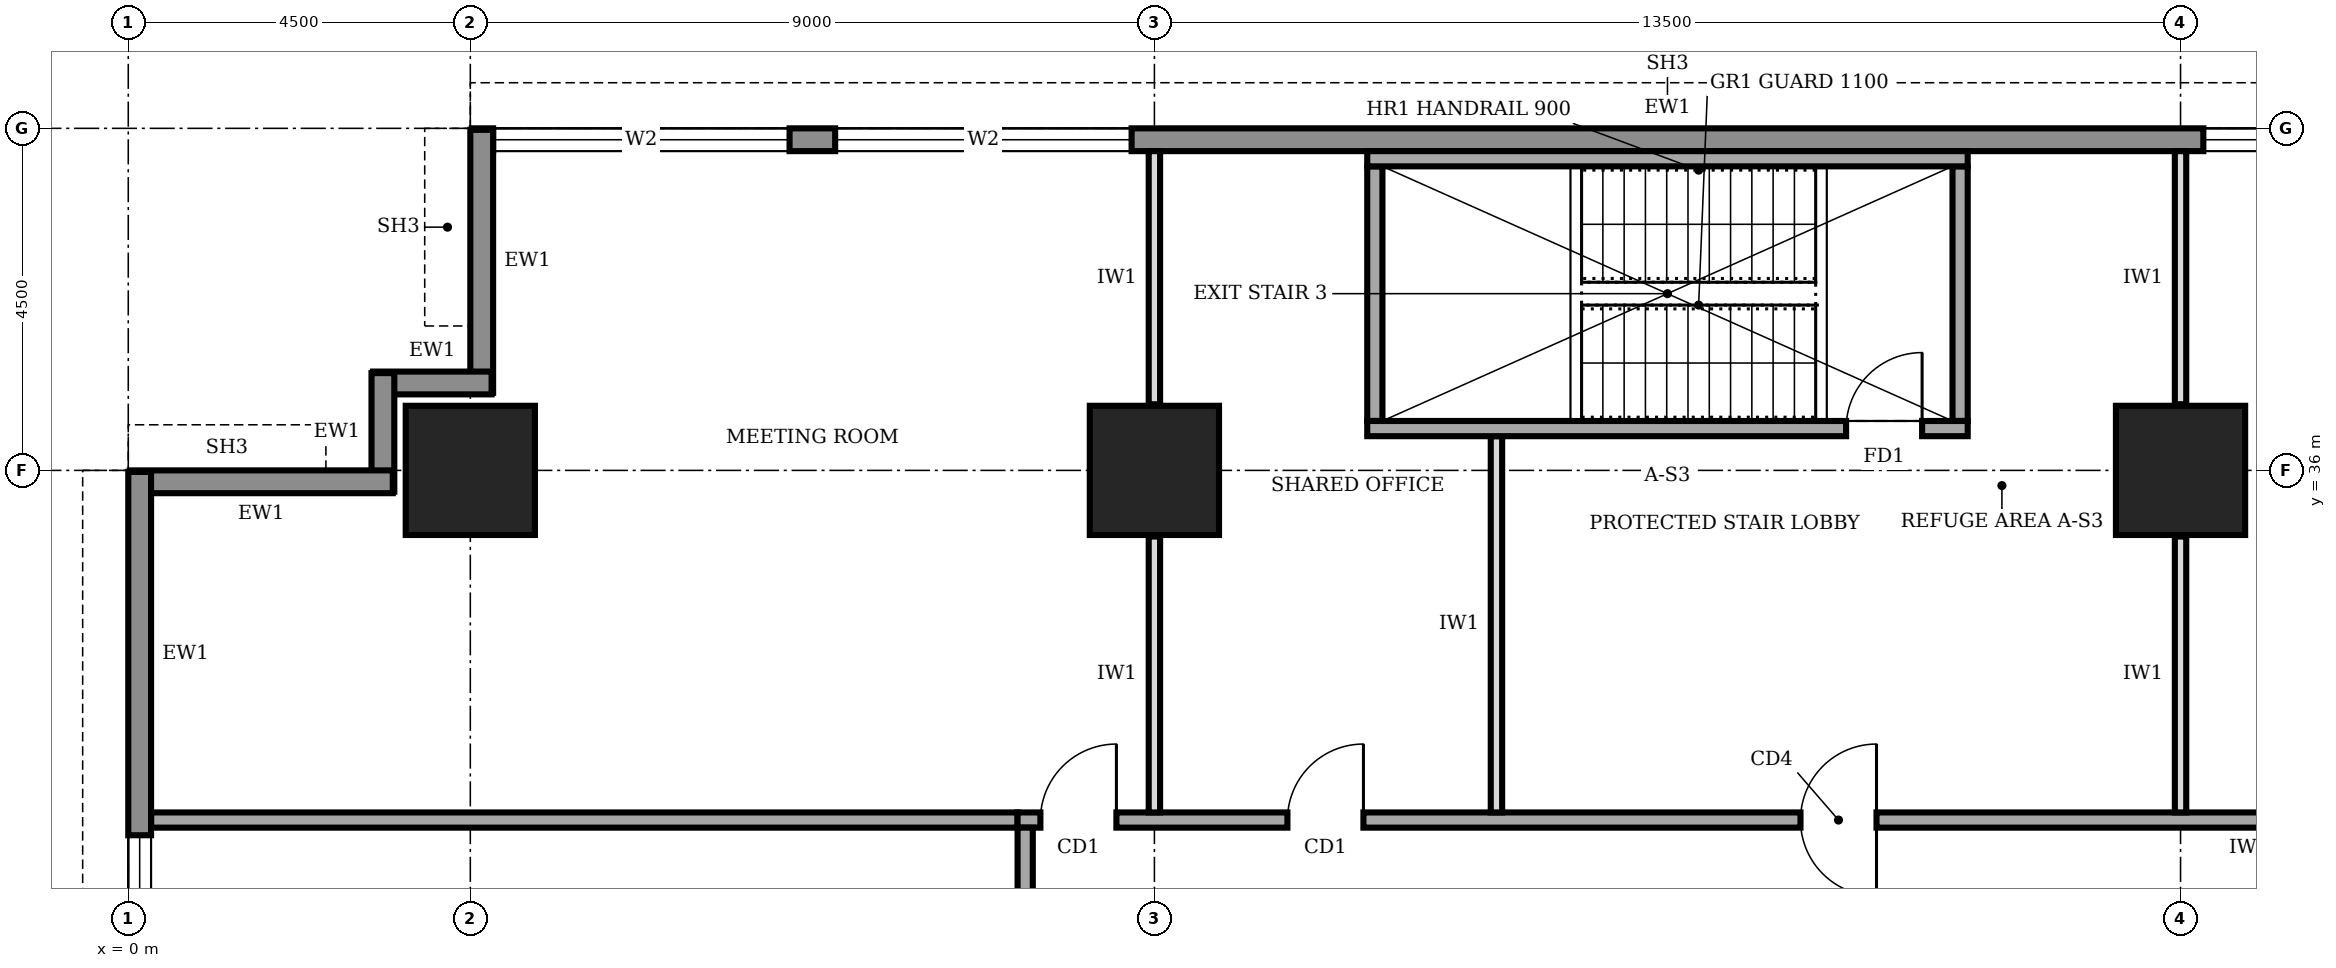
"""IFC4 building model, lengths in metres.
Left out: names, types, materials, properties, quantities, classifications, styles, units other than length and angle.
Written with IfcOpenShell. Run it as: python <this file> out.ifc"""

import sys

from ifc_helpers import new_model, si_unit, direction, frame, frame_2d, origin, origin_2d, place, context, subcontext, project, spatial, rectangle, extrude, element, fill, save


model = new_model("IFC4")
c1 = context("Model", 3, precision=1e-05, world=origin(), true_north=direction((0.0, 1.0)))
c2 = subcontext(c1, "Body", "Model", "MODEL_VIEW")
j1 = project(units=[si_unit("LENGTHUNIT", "METRE"), si_unit("PLANEANGLEUNIT", "RADIAN")], contexts=[c1])
p1 = place(None, origin())
s1 = spatial("IfcSite", under=j1, at=p1, CompositionType="ELEMENT")
p2 = place(p1, origin())
s2 = spatial("IfcBuilding", under=s1, at=p2, CompositionType="ELEMENT")
p3 = place(p2, frame((0.0, 0.0, 145.0)))
s3 = spatial("IfcBuildingStorey", under=s2, at=p3, CompositionType="ELEMENT", Elevation=145.0)
for number, where, z_axis, x_axis in (
    (1, (4.5, 36.0, 0.0), (0.0, 0.0, 1.0), (1.0, 0.0, 0.0)),
    (2, (13.5, 36.0, 0.0), (0.0, 0.0, 1.0), (1.0, 0.0, 0.0)),
    (3, (27.0, 36.0, 0.0), (0.0, 0.0, 1.0), (1.0, 0.0, 0.0)),
):
    element("IfcColumn", number, at=place(p3, frame(where, z_axis=z_axis, x_axis=x_axis)), inside=s3, PredefinedType="COLUMN", context=c2, shape_type="SweptSolid", body=[
        extrude(rectangle(XDim=1.7, YDim=1.7, at=origin_2d()), origin(), (0.0, 0.0, 1.0), 4.0),
    ])
p4 = place(p3, frame((35.98, 40.35, 0.0), z_axis=(0.0, 0.0, 1.0), x_axis=(-1.0, 0.0, 0.0)))
e4 = element("IfcWall", 4, at=p4, inside=s3, PredefinedType="STANDARD", context=c2, shape_type="SweptSolid", body=[
    extrude(rectangle(XDim=31.46, YDim=0.3, at=frame_2d((15.73, 0.0))), origin(), (0.0, 0.0, 1.0), 3.75),
])
p5 = place(p4, frame((27.28, 0.0, 0.6)))
e5 = element("IfcOpeningElement", 5, at=p5, cuts=e4, PredefinedType="OPENING", context=c2, shape_type="SweptSolid", body=[
    extrude(rectangle(XDim=3.9, YDim=2.6, at=frame_2d((1.95, 1.3))), frame((0.0, 0.16, 0.0), z_axis=(0.0, -1.0, 0.0), x_axis=(1.0, 0.0, 0.0)), (0.0, 0.0, 1.0), 0.32),
])
p6 = place(p4, frame((22.78, 0.0, 0.6)))
e6 = element("IfcOpeningElement", 6, at=p6, cuts=e4, PredefinedType="OPENING", context=c2, shape_type="SweptSolid", body=[
    extrude(rectangle(XDim=3.9, YDim=2.6, at=frame_2d((1.95, 1.3))), frame((0.0, 0.16, 0.0), z_axis=(0.0, -1.0, 0.0), x_axis=(1.0, 0.0, 0.0)), (0.0, 0.0, 1.0), 0.32),
])
p7 = place(p4, frame((4.78, 0.0, 0.6)))
e7 = element("IfcOpeningElement", 7, at=p7, cuts=e4, PredefinedType="OPENING", context=c2, shape_type="SweptSolid", body=[
    extrude(rectangle(XDim=3.9, YDim=2.6, at=frame_2d((1.95, 1.3))), frame((0.0, 0.16, 0.0), z_axis=(0.0, -1.0, 0.0), x_axis=(1.0, 0.0, 0.0)), (0.0, 0.0, 1.0), 0.32),
])
p8 = place(p3, frame((4.65, 40.48, 0.0), z_axis=(0.0, 0.0, 1.0), x_axis=(0.0, -1.0, 0.0)))
e8 = element("IfcWall", 8, at=p8, inside=s3, PredefinedType="STANDARD", context=c2, shape_type="SweptSolid", body=[
    extrude(rectangle(XDim=3.46, YDim=0.3, at=frame_2d((1.73, 0.0))), origin(), (0.0, 0.0, 1.0), 2.85),
])
for number, where, z_axis, x_axis in (
    (9, (4.78, 37.15, 0.0), (0.0, 0.0, 1.0), (-1.0, 0.0, 0.0)),
    (10, (3.35, 37.28, 0.0), (0.0, 0.0, 1.0), (0.0, -1.0, 0.0)),
):
    element("IfcWall", number, at=place(p3, frame(where, z_axis=z_axis, x_axis=x_axis)), inside=s3, PredefinedType="STANDARD", context=c2, shape_type="SweptSolid", body=[
        extrude(rectangle(XDim=1.56, YDim=0.3, at=frame_2d((0.78, 0.0))), origin(), (0.0, 0.0, 1.0), 3.75),
    ])
p9 = place(p3, frame((3.48, 35.85, 0.0), z_axis=(0.0, 0.0, 1.0), x_axis=(-1.0, 0.0, 0.0)))
e11 = element("IfcWall", 11, at=p9, inside=s3, PredefinedType="STANDARD", context=c2, shape_type="SweptSolid", body=[
    extrude(rectangle(XDim=3.46, YDim=0.3, at=frame_2d((1.73, 0.0))), origin(), (0.0, 0.0, 1.0), 2.85),
])
p10 = place(p3, frame((0.15, 35.98, 0.0), z_axis=(0.0, 0.0, 1.0), x_axis=(0.0, -1.0, 0.0)))
e12 = element("IfcWall", 12, at=p10, inside=s3, PredefinedType="STANDARD", context=c2, shape_type="SweptSolid", body=[
    extrude(rectangle(XDim=31.46, YDim=0.3, at=frame_2d((15.73, 0.0))), origin(), (0.0, 0.0, 1.0), 3.75),
])
p11 = place(p10, frame((27.28, 0.0, 0.6)))
e13 = element("IfcOpeningElement", 13, at=p11, cuts=e12, PredefinedType="OPENING", context=c2, shape_type="SweptSolid", body=[
    extrude(rectangle(XDim=3.9, YDim=2.6, at=frame_2d((1.95, 1.3))), frame((0.0, 0.16, 0.0), z_axis=(0.0, -1.0, 0.0), x_axis=(1.0, 0.0, 0.0)), (0.0, 0.0, 1.0), 0.32),
])
p12 = place(p10, frame((22.78, 0.0, 0.6)))
e14 = element("IfcOpeningElement", 14, at=p12, cuts=e12, PredefinedType="OPENING", context=c2, shape_type="SweptSolid", body=[
    extrude(rectangle(XDim=3.9, YDim=2.6, at=frame_2d((1.95, 1.3))), frame((0.0, 0.16, 0.0), z_axis=(0.0, -1.0, 0.0), x_axis=(1.0, 0.0, 0.0)), (0.0, 0.0, 1.0), 0.32),
])
p13 = place(p10, frame((18.28, 0.0, 0.6)))
e15 = element("IfcOpeningElement", 15, at=p13, cuts=e12, PredefinedType="OPENING", context=c2, shape_type="SweptSolid", body=[
    extrude(rectangle(XDim=3.9, YDim=2.6, at=frame_2d((1.95, 1.3))), frame((0.0, 0.16, 0.0), z_axis=(0.0, -1.0, 0.0), x_axis=(1.0, 0.0, 0.0)), (0.0, 0.0, 1.0), 0.32),
])
p14 = place(p10, frame((13.78, 0.0, 0.6)))
e16 = element("IfcOpeningElement", 16, at=p14, cuts=e12, PredefinedType="OPENING", context=c2, shape_type="SweptSolid", body=[
    extrude(rectangle(XDim=3.9, YDim=2.6, at=frame_2d((1.95, 1.3))), frame((0.0, 0.16, 0.0), z_axis=(0.0, -1.0, 0.0), x_axis=(1.0, 0.0, 0.0)), (0.0, 0.0, 1.0), 0.32),
])
p15 = place(p10, frame((9.28, 0.0, 0.6)))
e17 = element("IfcOpeningElement", 17, at=p15, cuts=e12, PredefinedType="OPENING", context=c2, shape_type="SweptSolid", body=[
    extrude(rectangle(XDim=3.9, YDim=2.6, at=frame_2d((1.95, 1.3))), frame((0.0, 0.16, 0.0), z_axis=(0.0, -1.0, 0.0), x_axis=(1.0, 0.0, 0.0)), (0.0, 0.0, 1.0), 0.32),
])
p16 = place(p10, frame((4.78, 0.0, 0.6)))
e18 = element("IfcOpeningElement", 18, at=p16, cuts=e12, PredefinedType="OPENING", context=c2, shape_type="SweptSolid", body=[
    extrude(rectangle(XDim=3.9, YDim=2.6, at=frame_2d((1.95, 1.3))), frame((0.0, 0.16, 0.0), z_axis=(0.0, -1.0, 0.0), x_axis=(1.0, 0.0, 0.0)), (0.0, 0.0, 1.0), 0.32),
])
p17 = place(p3, frame((40.2, 31.4, 0.0), z_axis=(0.0, 0.0, 1.0), x_axis=(-1.0, 0.0, 0.0)))
e19 = element("IfcWall", 19, at=p17, inside=s3, PredefinedType="SOLIDWALL", context=c2, shape_type="SweptSolid", body=[
    extrude(rectangle(XDim=28.5, YDim=0.2, at=frame_2d((14.25, 0.0))), origin(), (0.0, 0.0, 1.0), 3.75),
])
p18 = place(p17, frame((27.2, 0.0, 0.0)))
e20 = element("IfcOpeningElement", 20, at=p18, cuts=e19, PredefinedType="OPENING", context=c2, shape_type="SweptSolid", body=[
    extrude(rectangle(XDim=1.0, YDim=2.1, at=frame_2d((0.5, 1.05))), frame((0.0, 0.11, 0.0), z_axis=(0.0, -1.0, 0.0), x_axis=(1.0, 0.0, 0.0)), (0.0, 0.0, 1.0), 0.22),
])
p19 = place(p17, frame((23.95, 0.0, 0.0)))
e21 = element("IfcOpeningElement", 21, at=p19, cuts=e19, PredefinedType="OPENING", context=c2, shape_type="SweptSolid", body=[
    extrude(rectangle(XDim=1.0, YDim=2.1, at=frame_2d((0.5, 1.05))), frame((0.0, 0.11, 0.0), z_axis=(0.0, -1.0, 0.0), x_axis=(1.0, 0.0, 0.0)), (0.0, 0.0, 1.0), 0.22),
])
p20 = place(p17, frame((17.2, 0.0, 0.0)))
e22 = element("IfcOpeningElement", 22, at=p20, cuts=e19, PredefinedType="OPENING", context=c2, shape_type="SweptSolid", body=[
    extrude(rectangle(XDim=1.0, YDim=2.1, at=frame_2d((0.5, 1.05))), frame((0.0, 0.11, 0.0), z_axis=(0.0, -1.0, 0.0), x_axis=(1.0, 0.0, 0.0)), (0.0, 0.0, 1.0), 0.22),
])
p21 = place(p17, frame((5.6, 0.0, 0.0)))
e23 = element("IfcOpeningElement", 23, at=p21, cuts=e19, PredefinedType="OPENING", context=c2, shape_type="SweptSolid", body=[
    extrude(rectangle(XDim=1.8, YDim=2.1, at=frame_2d((0.9, 1.05))), frame((0.0, 0.11, 0.0), z_axis=(0.0, -1.0, 0.0), x_axis=(1.0, 0.0, 0.0)), (0.0, 0.0, 1.0), 0.22),
])
p22 = place(p3, frame((11.8, 31.3, 0.0), z_axis=(0.0, 0.0, 1.0), x_axis=(0.0, -1.0, 0.0)))
e24 = element("IfcWall", 24, at=p22, inside=s3, PredefinedType="SOLIDWALL", context=c2, shape_type="SweptSolid", body=[
    extrude(rectangle(XDim=22.3, YDim=0.2, at=frame_2d((11.15, 0.0))), origin(), (0.0, 0.0, 1.0), 3.75),
])
p23 = place(p22, frame((19.55, 0.0, 0.0)))
e25 = element("IfcOpeningElement", 25, at=p23, cuts=e24, PredefinedType="OPENING", context=c2, shape_type="SweptSolid", body=[
    extrude(rectangle(XDim=1.0, YDim=2.1, at=frame_2d((0.5, 1.05))), frame((0.0, 0.11, 0.0), z_axis=(0.0, -1.0, 0.0), x_axis=(1.0, 0.0, 0.0)), (0.0, 0.0, 1.0), 0.22),
])
p24 = place(p22, frame((16.15, 0.0, 0.0)))
e26 = element("IfcOpeningElement", 26, at=p24, cuts=e24, PredefinedType="OPENING", context=c2, shape_type="SweptSolid", body=[
    extrude(rectangle(XDim=0.9, YDim=2.1, at=frame_2d((0.45, 1.05))), frame((0.0, 0.11, 0.0), z_axis=(0.0, -1.0, 0.0), x_axis=(1.0, 0.0, 0.0)), (0.0, 0.0, 1.0), 0.22),
])
p25 = place(p22, frame((12.95, 0.0, 0.0)))
e27 = element("IfcOpeningElement", 27, at=p25, cuts=e24, PredefinedType="OPENING", context=c2, shape_type="SweptSolid", body=[
    extrude(rectangle(XDim=0.9, YDim=2.1, at=frame_2d((0.45, 1.05))), frame((0.0, 0.11, 0.0), z_axis=(0.0, -1.0, 0.0), x_axis=(1.0, 0.0, 0.0)), (0.0, 0.0, 1.0), 0.22),
])
p26 = place(p22, frame((7.4, 0.0, 0.0)))
e28 = element("IfcOpeningElement", 28, at=p26, cuts=e24, PredefinedType="OPENING", context=c2, shape_type="SweptSolid", body=[
    extrude(rectangle(XDim=0.9, YDim=2.1, at=frame_2d((0.45, 1.05))), frame((0.0, 0.11, 0.0), z_axis=(0.0, -1.0, 0.0), x_axis=(1.0, 0.0, 0.0)), (0.0, 0.0, 1.0), 0.22),
])
p27 = place(p22, frame((4.8, 0.0, 0.0)))
e29 = element("IfcOpeningElement", 29, at=p27, cuts=e24, PredefinedType="OPENING", context=c2, shape_type="SweptSolid", body=[
    extrude(rectangle(XDim=1.0, YDim=2.1, at=frame_2d((0.5, 1.05))), frame((0.0, 0.11, 0.0), z_axis=(0.0, -1.0, 0.0), x_axis=(1.0, 0.0, 0.0)), (0.0, 0.0, 1.0), 0.22),
])
p28 = place(p22, frame((9.9, 0.0, 0.0)))
e30 = element("IfcOpeningElement", 30, at=p28, cuts=e24, PredefinedType="OPENING", context=c2, shape_type="SweptSolid", body=[
    extrude(rectangle(XDim=1.0, YDim=2.1, at=frame_2d((0.5, 1.05))), frame((0.0, 0.11, 0.0), z_axis=(0.0, -1.0, 0.0), x_axis=(1.0, 0.0, 0.0)), (0.0, 0.0, 1.0), 0.22),
])
p29 = place(p22, frame((1.55, 0.0, 0.0)))
e31 = element("IfcOpeningElement", 31, at=p29, cuts=e24, PredefinedType="OPENING", context=c2, shape_type="SweptSolid", body=[
    extrude(rectangle(XDim=1.0, YDim=2.1, at=frame_2d((0.5, 1.05))), frame((0.0, 0.11, 0.0), z_axis=(0.0, -1.0, 0.0), x_axis=(1.0, 0.0, 0.0)), (0.0, 0.0, 1.0), 0.22),
])
p30 = place(p3, frame((0.3, 31.4, 0.0), z_axis=(0.0, 0.0, 1.0), x_axis=(1.0, 0.0, 0.0)))
e32 = element("IfcWall", 32, at=p30, inside=s3, PredefinedType="SOLIDWALL", context=c2, shape_type="SweptSolid", body=[
    extrude(rectangle(XDim=11.4, YDim=0.2, at=frame_2d((5.7, 0.0))), origin(), (0.0, 0.0, 1.0), 3.75),
])
p31 = place(p3, frame((13.5, 31.5, 0.0), z_axis=(0.0, 0.0, 1.0), x_axis=(0.0, 1.0, 0.0)))
e33 = element("IfcWall", 33, at=p31, inside=s3, PredefinedType="PARTITIONING", context=c2, shape_type="SweptSolid", body=[
    extrude(rectangle(XDim=3.63, YDim=0.15, at=frame_2d((1.815, 0.0))), origin(), (0.0, 0.0, 1.0), 2.85),
])
p32 = place(p3, frame((13.5, 36.87, 0.0), z_axis=(0.0, 0.0, 1.0), x_axis=(0.0, 1.0, 0.0)))
e34 = element("IfcWall", 34, at=p32, inside=s3, PredefinedType="PARTITIONING", context=c2, shape_type="SweptSolid", body=[
    extrude(rectangle(XDim=3.33, YDim=0.15, at=frame_2d((1.665, 0.0))), origin(), (0.0, 0.0, 1.0), 2.85),
])
p33 = place(p3, frame((18.0, 31.5, 0.0), z_axis=(0.0, 0.0, 1.0), x_axis=(0.0, 1.0, 0.0)))
e35 = element("IfcWall", 35, at=p33, inside=s3, PredefinedType="PARTITIONING", context=c2, shape_type="SweptSolid", body=[
    extrude(rectangle(XDim=4.95, YDim=0.15, at=frame_2d((2.475, 0.0))), origin(), (0.0, 0.0, 1.0), 3.75),
])
p34 = place(p3, frame((27.0, 31.5, 0.0), z_axis=(0.0, 0.0, 1.0), x_axis=(0.0, 1.0, 0.0)))
e36 = element("IfcWall", 36, at=p34, inside=s3, PredefinedType="PARTITIONING", context=c2, shape_type="SweptSolid", body=[
    extrude(rectangle(XDim=3.63, YDim=0.15, at=frame_2d((1.815, 0.0))), origin(), (0.0, 0.0, 1.0), 2.85),
])
p35 = place(p3, frame((27.0, 36.87, 0.0), z_axis=(0.0, 0.0, 1.0), x_axis=(0.0, 1.0, 0.0)))
e37 = element("IfcWall", 37, at=p35, inside=s3, PredefinedType="PARTITIONING", context=c2, shape_type="SweptSolid", body=[
    extrude(rectangle(XDim=3.33, YDim=0.15, at=frame_2d((1.665, 0.0))), origin(), (0.0, 0.0, 1.0), 2.85),
])
p36 = place(p3, frame((16.3, 36.55, 0.0), z_axis=(0.0, 0.0, 1.0), x_axis=(1.0, 0.0, 0.0)))
e38 = element("IfcWall", 38, at=p36, inside=s3, PredefinedType="SOLIDWALL", context=c2, shape_type="SweptSolid", body=[
    extrude(rectangle(XDim=7.9, YDim=0.2, at=frame_2d((3.95, 0.0))), origin(), (0.0, 0.0, 1.0), 3.75),
])
p37 = place(p36, frame((6.3, 0.0, 0.0)))
e39 = element("IfcOpeningElement", 39, at=p37, cuts=e38, PredefinedType="OPENING", context=c2, shape_type="SweptSolid", body=[
    extrude(rectangle(XDim=1.0, YDim=2.1, at=frame_2d((0.5, 1.05))), frame((0.0, 0.11, 0.0), z_axis=(0.0, -1.0, 0.0), x_axis=(1.0, 0.0, 0.0)), (0.0, 0.0, 1.0), 0.22),
])
p38 = place(p3, frame((16.3, 40.1, 0.0), z_axis=(0.0, 0.0, 1.0), x_axis=(1.0, 0.0, 0.0)))
e40 = element("IfcWall", 40, at=p38, inside=s3, PredefinedType="SOLIDWALL", context=c2, shape_type="SweptSolid", body=[
    extrude(rectangle(XDim=7.9, YDim=0.2, at=frame_2d((3.95, 0.0))), origin(), (0.0, 0.0, 1.0), 3.75),
])
for number, where, z_axis, x_axis in (
    (41, (16.4, 36.65, 0.0), (0.0, 0.0, 1.0), (0.0, 1.0, 0.0)),
    (42, (24.1, 36.65, 0.0), (0.0, 0.0, 1.0), (0.0, 1.0, 0.0)),
):
    element("IfcWall", number, at=place(p3, frame(where, z_axis=z_axis, x_axis=x_axis)), inside=s3, PredefinedType="SOLIDWALL", context=c2, shape_type="SweptSolid", body=[
        extrude(rectangle(XDim=3.35, YDim=0.2, at=frame_2d((1.675, 0.0))), origin(), (0.0, 0.0, 1.0), 3.75),
    ])
p39 = place(p5, origin())
e43 = element("IfcWindow", 43, at=p39, inside=s3, PartitioningType="SINGLE_PANEL", PredefinedType="WINDOW", context=c2, shape_type="SweptSolid", body=[
    extrude(rectangle(XDim=3.9, YDim=2.6, at=frame_2d((1.95, 1.3))), frame((0.0, 0.03, 0.0), z_axis=(0.0, -1.0, 0.0), x_axis=(1.0, 0.0, 0.0)), (0.0, 0.0, 1.0), 0.06),
])
fill(e5, e43)
p40 = place(p6, origin())
e44 = element("IfcWindow", 44, at=p40, inside=s3, PartitioningType="SINGLE_PANEL", PredefinedType="WINDOW", context=c2, shape_type="SweptSolid", body=[
    extrude(rectangle(XDim=3.9, YDim=2.6, at=frame_2d((1.95, 1.3))), frame((0.0, 0.03, 0.0), z_axis=(0.0, -1.0, 0.0), x_axis=(1.0, 0.0, 0.0)), (0.0, 0.0, 1.0), 0.06),
])
fill(e6, e44)
p41 = place(p7, origin())
e45 = element("IfcWindow", 45, at=p41, inside=s3, PartitioningType="SINGLE_PANEL", PredefinedType="WINDOW", context=c2, shape_type="SweptSolid", body=[
    extrude(rectangle(XDim=3.9, YDim=2.6, at=frame_2d((1.95, 1.3))), frame((0.0, 0.03, 0.0), z_axis=(0.0, -1.0, 0.0), x_axis=(1.0, 0.0, 0.0)), (0.0, 0.0, 1.0), 0.06),
])
fill(e7, e45)
p42 = place(p16, origin())
e46 = element("IfcWindow", 46, at=p42, inside=s3, PartitioningType="SINGLE_PANEL", PredefinedType="WINDOW", context=c2, shape_type="SweptSolid", body=[
    extrude(rectangle(XDim=3.9, YDim=2.6, at=frame_2d((1.95, 1.3))), frame((0.0, 0.03, 0.0), z_axis=(0.0, -1.0, 0.0), x_axis=(1.0, 0.0, 0.0)), (0.0, 0.0, 1.0), 0.06),
])
fill(e18, e46)
p43 = place(p18, frame((1.0, 0.0, 0.0), z_axis=(0.0, 0.0, 1.0), x_axis=(-1.0, 0.0, 0.0)))
e47 = element("IfcDoor", 47, at=p43, inside=s3, OperationType="SINGLE_SWING_RIGHT", PredefinedType="DOOR", context=c2, shape_type="SweptSolid", body=[
    extrude(rectangle(XDim=1.0, YDim=2.1, at=frame_2d((0.5, 1.05))), frame((0.0, 0.025, 0.0), z_axis=(0.0, -1.0, 0.0), x_axis=(1.0, 0.0, 0.0)), (0.0, 0.0, 1.0), 0.05),
])
fill(e20, e47)
p44 = place(p19, frame((1.0, 0.0, 0.0), z_axis=(0.0, 0.0, 1.0), x_axis=(-1.0, 0.0, 0.0)))
e48 = element("IfcDoor", 48, at=p44, inside=s3, OperationType="SINGLE_SWING_RIGHT", PredefinedType="DOOR", context=c2, shape_type="SweptSolid", body=[
    extrude(rectangle(XDim=1.0, YDim=2.1, at=frame_2d((0.5, 1.05))), frame((0.0, 0.025, 0.0), z_axis=(0.0, -1.0, 0.0), x_axis=(1.0, 0.0, 0.0)), (0.0, 0.0, 1.0), 0.05),
])
fill(e21, e48)
p45 = place(p20, origin())
e49 = element("IfcDoor", 49, at=p45, inside=s3, OperationType="DOUBLE_SWING_LEFT", PredefinedType="DOOR", context=c2, shape_type="SweptSolid", body=[
    extrude(rectangle(XDim=1.0, YDim=2.1, at=frame_2d((0.5, 1.05))), frame((0.0, 0.025, 0.0), z_axis=(0.0, -1.0, 0.0), x_axis=(1.0, 0.0, 0.0)), (0.0, 0.0, 1.0), 0.05),
])
fill(e22, e49)
p46 = place(p37, origin())
e50 = element("IfcDoor", 50, at=p46, inside=s3, OperationType="SINGLE_SWING_RIGHT", PredefinedType="DOOR", context=c2, shape_type="SweptSolid", body=[
    extrude(rectangle(XDim=1.0, YDim=2.1, at=frame_2d((0.5, 1.05))), frame((0.0, 0.025, 0.0), z_axis=(0.0, -1.0, 0.0), x_axis=(1.0, 0.0, 0.0)), (0.0, 0.0, 1.0), 0.05),
])
fill(e39, e50)
save(model, sys.argv[1])
